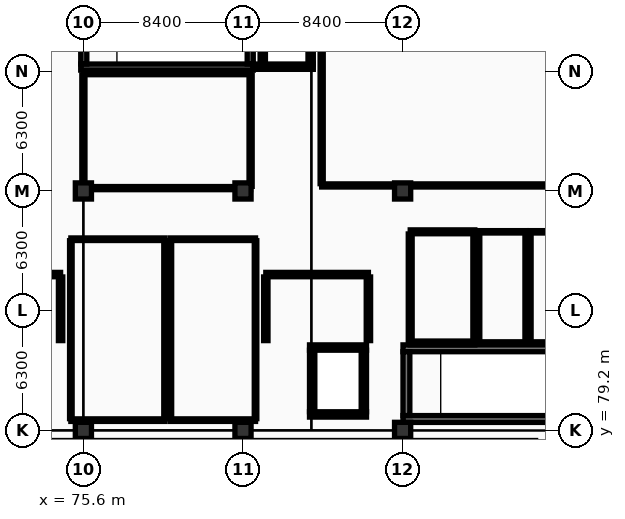
"""IFC4 building model, lengths in metres.
Left out: names, types, materials, properties, quantities, classifications, styles, units other than length and angle.
Written with IfcOpenShell. Run it as: python <this file> out.ifc"""

import sys

from ifc_helpers import new_model, si_unit, direction, frame, frame_2d, origin, origin_2d, place, context, subcontext, project, spatial, rectangle, extrude, element, fill, save


model = new_model("IFC4")
c1 = context("Model", 3, precision=1e-05, world=origin(), true_north=direction((0.0, 1.0)))
c2 = subcontext(c1, "Body", "Model", "MODEL_VIEW")
j1 = project(units=[si_unit("LENGTHUNIT", "METRE"), si_unit("PLANEANGLEUNIT", "RADIAN")], contexts=[c1])
p1 = place(None, origin())
s1 = spatial("IfcSite", under=j1, at=p1, CompositionType="ELEMENT")
p2 = place(p1, origin())
s2 = spatial("IfcBuilding", under=s1, at=p2, CompositionType="ELEMENT")
p3 = place(p2, frame((0.0, 0.0, 5.4)))
s3 = spatial("IfcBuildingStorey", under=s2, at=p3, CompositionType="ELEMENT", Elevation=5.4)
for number, where, z_axis, x_axis in (
    (1, (75.6, 79.2, 0.0), (0.0, 0.0, 1.0), (1.0, 0.0, 0.0)),
    (2, (75.6, 91.8, 0.0), (0.0, 0.0, 1.0), (1.0, 0.0, 0.0)),
    (3, (84.0, 79.2, 0.0), (0.0, 0.0, 1.0), (1.0, 0.0, 0.0)),
    (4, (84.0, 91.8, 0.0), (0.0, 0.0, 1.0), (1.0, 0.0, 0.0)),
    (5, (92.4, 79.2, 0.0), (0.0, 0.0, 1.0), (1.0, 0.0, 0.0)),
    (6, (92.4, 91.8, 0.0), (0.0, 0.0, 1.0), (1.0, 0.0, 0.0)),
):
    element("IfcColumn", number, at=place(p3, frame(where, z_axis=z_axis, x_axis=x_axis)), inside=s3, PredefinedType="COLUMN", context=c2, shape_type="SweptSolid", body=[
        extrude(rectangle(XDim=0.85, YDim=0.85, at=origin_2d()), origin(), (0.0, 0.0, 1.0), 4.5),
    ])
for number, where, z_axis, x_axis in (
    (7, (92.42, 83.52, 0.0), (0.0, 0.0, 1.0), (1.0, 0.0, 0.0)),
    (8, (101.78, 79.8, 0.0), (0.0, 0.0, 1.0), (-1.0, 0.0, 0.0)),
):
    element("IfcWall", number, at=place(p3, frame(where, z_axis=z_axis, x_axis=x_axis)), inside=s3, PredefinedType="SHEAR", context=c2, shape_type="SweptSolid", body=[
        extrude(rectangle(XDim=9.36, YDim=0.36, at=frame_2d((4.68, 0.0))), origin(), (0.0, 0.0, 1.0), 4.24),
    ])
p4 = place(p3, frame((92.6, 79.98, 0.0), z_axis=(0.0, 0.0, 1.0), x_axis=(0.0, 1.0, 0.0)))
e9 = element("IfcWall", 9, at=p4, inside=s3, PredefinedType="SHEAR", context=c2, shape_type="SweptSolid", body=[
    extrude(rectangle(XDim=3.36, YDim=0.36, at=frame_2d((1.68, 0.0))), origin(), (0.0, 0.0, 1.0), 4.24),
])
p5 = place(p4, frame((1.08, 0.0, 0.0)))
e10 = element("IfcOpeningElement", 10, at=p5, cuts=e9, PredefinedType="OPENING", context=c2, shape_type="SweptSolid", body=[
    extrude(rectangle(XDim=1.2, YDim=2.2, at=frame_2d((0.6, 1.1))), frame((0.0, 0.19, 0.0), z_axis=(0.0, -1.0, 0.0), x_axis=(1.0, 0.0, 0.0)), (0.0, 0.0, 1.0), 0.38),
])
p6 = place(p3, frame((84.54, 98.32, 0.0), z_axis=(0.0, 0.0, 1.0), x_axis=(-1.0, 0.0, 0.0)))
e11 = element("IfcWall", 11, at=p6, inside=s3, PredefinedType="SHEAR", context=c2, shape_type="SweptSolid", body=[
    extrude(rectangle(XDim=9.08, YDim=0.32, at=frame_2d((4.54, 0.0))), origin(), (0.0, 0.0, 1.0), 4.24),
])
p7 = place(p3, frame((75.62, 98.48, 0.0), z_axis=(0.0, 0.0, 1.0), x_axis=(0.0, 1.0, 0.0)))
e12 = element("IfcWall", 12, at=p7, inside=s3, PredefinedType="SHEAR", context=c2, shape_type="SweptSolid", body=[
    extrude(rectangle(XDim=3.28, YDim=0.32, at=frame_2d((1.64, 0.0))), origin(), (0.0, 0.0, 1.0), 4.24),
])
p8 = place(p7, frame((1.065, 0.0, 0.0)))
e13 = element("IfcOpeningElement", 13, at=p8, cuts=e12, PredefinedType="OPENING", context=c2, shape_type="SweptSolid", body=[
    extrude(rectangle(XDim=1.15, YDim=2.2, at=frame_2d((0.575, 1.1))), frame((0.0, 0.17, 0.0), z_axis=(0.0, -1.0, 0.0), x_axis=(1.0, 0.0, 0.0)), (0.0, 0.0, 1.0), 0.34),
])
p9 = place(p3, frame((84.38, 101.76, 0.0), z_axis=(0.0, 0.0, 1.0), x_axis=(0.0, -1.0, 0.0)))
e14 = element("IfcWall", 14, at=p9, inside=s3, PredefinedType="SHEAR", context=c2, shape_type="SweptSolid", body=[
    extrude(rectangle(XDim=3.28, YDim=0.32, at=frame_2d((1.64, 0.0))), origin(), (0.0, 0.0, 1.0), 4.24),
])
p10 = place(p3, frame((87.5, 83.56, 0.0), z_axis=(0.0, 0.0, 1.0), x_axis=(1.0, 0.0, 0.0)))
e15 = element("IfcWall", 15, at=p10, inside=s3, PredefinedType="SHEAR", context=c2, shape_type="SweptSolid", body=[
    extrude(rectangle(XDim=3.0, YDim=0.28, at=frame_2d((1.5, 0.0))), origin(), (0.0, 0.0, 1.0), 4.24),
])
p11 = place(p10, frame((0.95, 0.0, 0.0)))
e16 = element("IfcOpeningElement", 16, at=p11, cuts=e15, PredefinedType="OPENING", context=c2, shape_type="SweptSolid", body=[
    extrude(rectangle(XDim=1.1, YDim=2.2, at=frame_2d((0.55, 1.1))), frame((0.0, 0.15, 0.0), z_axis=(0.0, -1.0, 0.0), x_axis=(1.0, 0.0, 0.0)), (0.0, 0.0, 1.0), 0.3),
])
p12 = place(p3, frame((90.5, 80.04, 0.0), z_axis=(0.0, 0.0, 1.0), x_axis=(-1.0, 0.0, 0.0)))
e17 = element("IfcWall", 17, at=p12, inside=s3, PredefinedType="SHEAR", context=c2, shape_type="SweptSolid", body=[
    extrude(rectangle(XDim=3.0, YDim=0.28, at=frame_2d((1.5, 0.0))), origin(), (0.0, 0.0, 1.0), 4.24),
])
for number, where, z_axis, x_axis in (
    (18, (87.64, 80.18, 0.0), (0.0, 0.0, 1.0), (0.0, 1.0, 0.0)),
    (19, (90.36, 83.42, 0.0), (0.0, 0.0, 1.0), (0.0, -1.0, 0.0)),
):
    element("IfcWall", number, at=place(p3, frame(where, z_axis=z_axis, x_axis=x_axis)), inside=s3, PredefinedType="SHEAR", context=c2, shape_type="SweptSolid", body=[
        extrude(rectangle(XDim=3.24, YDim=0.28, at=frame_2d((1.62, 0.0))), origin(), (0.0, 0.0, 1.0), 4.24),
    ])
p13 = place(p3, frame((87.7, 98.34, 0.0), z_axis=(0.0, 0.0, 1.0), x_axis=(-1.0, 0.0, 0.0)))
e20 = element("IfcWall", 20, at=p13, inside=s3, PredefinedType="SHEAR", context=c2, shape_type="SweptSolid", body=[
    extrude(rectangle(XDim=3.16, YDim=0.28, at=frame_2d((1.58, 0.0))), origin(), (0.0, 0.0, 1.0), 4.24),
])
p14 = place(p13, frame((0.925, 0.0, 0.0)))
e21 = element("IfcOpeningElement", 21, at=p14, cuts=e20, PredefinedType="OPENING", context=c2, shape_type="SweptSolid", body=[
    extrude(rectangle(XDim=0.95, YDim=2.15, at=frame_2d((0.475, 1.075))), frame((0.0, 0.15, 0.0), z_axis=(0.0, -1.0, 0.0), x_axis=(1.0, 0.0, 0.0)), (0.0, 0.0, 1.0), 0.3),
])
for number, where, z_axis, x_axis in (
    (22, (85.04, 98.48, 0.0), (0.0, 0.0, 1.0), (0.0, 1.0, 0.0)),
    (23, (87.56, 100.92, 0.0), (0.0, 0.0, 1.0), (0.0, -1.0, 0.0)),
):
    element("IfcWall", number, at=place(p3, frame(where, z_axis=z_axis, x_axis=x_axis)), inside=s3, PredefinedType="SHEAR", context=c2, shape_type="SweptSolid", body=[
        extrude(rectangle(XDim=2.44, YDim=0.28, at=frame_2d((1.22, 0.0))), origin(), (0.0, 0.0, 1.0), 4.24),
    ])
p15 = place(p3, frame((69.0, 87.4, 0.0), z_axis=(0.0, 0.0, 1.0), x_axis=(1.0, 0.0, 0.0)))
e24 = element("IfcWall", 24, at=p15, inside=s3, PredefinedType="STANDARD", context=c2, shape_type="SweptSolid", body=[
    extrude(rectangle(XDim=5.4, YDim=0.23, at=frame_2d((2.7, 0.0))), origin(), (0.0, 0.0, 1.0), 4.225),
])
p16 = place(p15, frame((2.05, 0.0, 0.0)))
e25 = element("IfcOpeningElement", 25, at=p16, cuts=e24, PredefinedType="OPENING", context=c2, shape_type="SweptSolid", body=[
    extrude(rectangle(XDim=1.3, YDim=2.2, at=frame_2d((0.65, 1.1))), frame((0.0, 0.125, 0.0), z_axis=(0.0, -1.0, 0.0), x_axis=(1.0, 0.0, 0.0)), (0.0, 0.0, 1.0), 0.25),
])
p17 = place(p3, frame((74.4, 87.275, 0.0), z_axis=(0.0, 0.0, 1.0), x_axis=(0.0, -1.0, 0.0)))
e26 = element("IfcWall", 26, at=p17, inside=s3, PredefinedType="STANDARD", context=c2, shape_type="SweptSolid", body=[
    extrude(rectangle(XDim=3.35, YDim=0.23, at=frame_2d((1.675, 0.0))), origin(), (0.0, 0.0, 1.0), 4.225),
])
p18 = place(p3, frame((85.2, 87.4, 0.0), z_axis=(0.0, 0.0, 1.0), x_axis=(1.0, 0.0, 0.0)))
e27 = element("IfcWall", 27, at=p18, inside=s3, PredefinedType="STANDARD", context=c2, shape_type="SweptSolid", body=[
    extrude(rectangle(XDim=5.4, YDim=0.23, at=frame_2d((2.7, 0.0))), origin(), (0.0, 0.0, 1.0), 3.62),
])
p19 = place(p18, frame((2.05, 0.0, 0.0)))
e28 = element("IfcOpeningElement", 28, at=p19, cuts=e27, PredefinedType="OPENING", context=c2, shape_type="SweptSolid", body=[
    extrude(rectangle(XDim=1.3, YDim=2.2, at=frame_2d((0.65, 1.1))), frame((0.0, 0.125, 0.0), z_axis=(0.0, -1.0, 0.0), x_axis=(1.0, 0.0, 0.0)), (0.0, 0.0, 1.0), 0.25),
])
for number, where, z_axis, x_axis in (
    (29, (85.2, 83.925, 0.0), (0.0, 0.0, 1.0), (0.0, 1.0, 0.0)),
    (30, (90.6, 87.275, 0.0), (0.0, 0.0, 1.0), (0.0, -1.0, 0.0)),
):
    element("IfcWall", number, at=place(p3, frame(where, z_axis=z_axis, x_axis=x_axis)), inside=s3, PredefinedType="STANDARD", context=c2, shape_type="SweptSolid", body=[
        extrude(rectangle(XDim=3.35, YDim=0.23, at=frame_2d((1.675, 0.0))), origin(), (0.0, 0.0, 1.0), 3.62),
    ])
p20 = place(p3, frame((96.4, 89.65, 0.0), z_axis=(0.0, 0.0, 1.0), x_axis=(1.0, 0.0, 0.0)))
e31 = element("IfcWall", 31, at=p20, inside=s3, PredefinedType="PARTITIONING", context=c2, shape_type="SweptSolid", body=[
    extrude(rectangle(XDim=2.5, YDim=0.125, at=frame_2d((1.25, 0.0))), origin(), (0.0, 0.0, 1.0), 4.225),
])
p21 = place(p20, frame((0.8, 0.0, 0.0)))
e32 = element("IfcOpeningElement", 32, at=p21, cuts=e31, PredefinedType="OPENING", context=c2, shape_type="SweptSolid", body=[
    extrude(rectangle(XDim=0.9, YDim=2.1, at=frame_2d((0.45, 1.05))), frame((0.0, 0.073, 0.0), z_axis=(0.0, -1.0, 0.0), x_axis=(1.0, 0.0, 0.0)), (0.0, 0.0, 1.0), 0.145),
])
p22 = place(p3, frame((98.9, 83.8, 0.0), z_axis=(0.0, 0.0, 1.0), x_axis=(-1.0, 0.0, 0.0)))
e33 = element("IfcWall", 33, at=p22, inside=s3, PredefinedType="PARTITIONING", context=c2, shape_type="SweptSolid", body=[
    extrude(rectangle(XDim=2.5, YDim=0.125, at=frame_2d((1.25, 0.0))), origin(), (0.0, 0.0, 1.0), 4.225),
])
for number, where, z_axis, x_axis in (
    (34, (96.4, 83.873, 0.0), (0.0, 0.0, 1.0), (0.0, 1.0, 0.0)),
    (35, (98.9, 89.577, 0.0), (0.0, 0.0, 1.0), (0.0, -1.0, 0.0)),
):
    element("IfcWall", number, at=place(p3, frame(where, z_axis=z_axis, x_axis=x_axis)), inside=s3, PredefinedType="PARTITIONING", context=c2, shape_type="SweptSolid", body=[
        extrude(rectangle(XDim=5.705, YDim=0.125, at=frame_2d((2.853, 0.0))), origin(), (0.0, 0.0, 1.0), 3.62),
    ])
p23 = place(p3, frame((99.1, 89.65, 0.0), z_axis=(0.0, 0.0, 1.0), x_axis=(1.0, 0.0, 0.0)))
e36 = element("IfcWall", 36, at=p23, inside=s3, PredefinedType="PARTITIONING", context=c2, shape_type="SweptSolid", body=[
    extrude(rectangle(XDim=2.5, YDim=0.125, at=frame_2d((1.25, 0.0))), origin(), (0.0, 0.0, 1.0), 3.37),
])
p24 = place(p23, frame((0.75, 0.0, 0.0)))
e37 = element("IfcOpeningElement", 37, at=p24, cuts=e36, PredefinedType="OPENING", context=c2, shape_type="SweptSolid", body=[
    extrude(rectangle(XDim=1.0, YDim=2.1, at=frame_2d((0.5, 1.05))), frame((0.0, 0.073, 0.0), z_axis=(0.0, -1.0, 0.0), x_axis=(1.0, 0.0, 0.0)), (0.0, 0.0, 1.0), 0.145),
])
p25 = place(p3, frame((101.6, 83.8, 0.0), z_axis=(0.0, 0.0, 1.0), x_axis=(-1.0, 0.0, 0.0)))
e38 = element("IfcWall", 38, at=p25, inside=s3, PredefinedType="PARTITIONING", context=c2, shape_type="SweptSolid", body=[
    extrude(rectangle(XDim=2.5, YDim=0.125, at=frame_2d((1.25, 0.0))), origin(), (0.0, 0.0, 1.0), 3.37),
])
p26 = place(p3, frame((99.1, 83.873, 0.0), z_axis=(0.0, 0.0, 1.0), x_axis=(0.0, 1.0, 0.0)))
e39 = element("IfcWall", 39, at=p26, inside=s3, PredefinedType="PARTITIONING", context=c2, shape_type="SweptSolid", body=[
    extrude(rectangle(XDim=5.705, YDim=0.125, at=frame_2d((2.853, 0.0))), origin(), (0.0, 0.0, 1.0), 3.62),
])
p27 = place(p3, frame((92.8, 89.65, 0.0), z_axis=(0.0, 0.0, 1.0), x_axis=(1.0, 0.0, 0.0)))
e40 = element("IfcWall", 40, at=p27, inside=s3, PredefinedType="STANDARD", context=c2, shape_type="SweptSolid", body=[
    extrude(rectangle(XDim=3.4, YDim=0.205, at=frame_2d((1.7, 0.0))), origin(), (0.0, 0.0, 1.0), 3.37),
])
p28 = place(p27, frame((1.0, 0.0, 0.0)))
e41 = element("IfcOpeningElement", 41, at=p28, cuts=e40, PredefinedType="OPENING", context=c2, shape_type="SweptSolid", body=[
    extrude(rectangle(XDim=1.4, YDim=2.25, at=frame_2d((0.7, 1.125))), frame((0.0, 0.113, 0.0), z_axis=(0.0, -1.0, 0.0), x_axis=(1.0, 0.0, 0.0)), (0.0, 0.0, 1.0), 0.225),
])
p29 = place(p3, frame((96.2, 83.8, 0.0), z_axis=(0.0, 0.0, 1.0), x_axis=(-1.0, 0.0, 0.0)))
e42 = element("IfcWall", 42, at=p29, inside=s3, PredefinedType="STANDARD", context=c2, shape_type="SweptSolid", body=[
    extrude(rectangle(XDim=3.4, YDim=0.205, at=frame_2d((1.7, 0.0))), origin(), (0.0, 0.0, 1.0), 3.37),
])
p30 = place(p3, frame((92.8, 83.913, 0.0), z_axis=(0.0, 0.0, 1.0), x_axis=(0.0, 1.0, 0.0)))
e43 = element("IfcWall", 43, at=p30, inside=s3, PredefinedType="STANDARD", context=c2, shape_type="SweptSolid", body=[
    extrude(rectangle(XDim=5.625, YDim=0.205, at=frame_2d((2.812, 0.0))), origin(), (0.0, 0.0, 1.0), 3.37),
])
p31 = place(p3, frame((96.2, 89.538, 0.0), z_axis=(0.0, 0.0, 1.0), x_axis=(0.0, -1.0, 0.0)))
e44 = element("IfcWall", 44, at=p31, inside=s3, PredefinedType="STANDARD", context=c2, shape_type="SweptSolid", body=[
    extrude(rectangle(XDim=5.625, YDim=0.205, at=frame_2d((2.812, 0.0))), origin(), (0.0, 0.0, 1.0), 3.62),
])
p32 = place(p3, frame((75.6, 98.0, 0.0), z_axis=(0.0, 0.0, 1.0), x_axis=(1.0, 0.0, 0.0)))
e45 = element("IfcWall", 45, at=p32, inside=s3, PredefinedType="PARTITIONING", context=c2, shape_type="SweptSolid", body=[
    extrude(rectangle(XDim=8.8, YDim=0.165, at=frame_2d((4.4, 0.0))), origin(), (0.0, 0.0, 1.0), 3.37),
])
p33 = place(p3, frame((84.4, 91.95, 0.0), z_axis=(0.0, 0.0, 1.0), x_axis=(-1.0, 0.0, 0.0)))
e46 = element("IfcWall", 46, at=p33, inside=s3, PredefinedType="PARTITIONING", context=c2, shape_type="SweptSolid", body=[
    extrude(rectangle(XDim=8.8, YDim=0.165, at=frame_2d((4.4, 0.0))), origin(), (0.0, 0.0, 1.0), 3.37),
])
p34 = place(p33, frame((3.545, 0.0, 0.0)))
e47 = element("IfcOpeningElement", 47, at=p34, cuts=e46, PredefinedType="OPENING", context=c2, shape_type="SweptSolid", body=[
    extrude(rectangle(XDim=1.0, YDim=2.15, at=frame_2d((0.5, 1.075))), frame((0.0, 0.093, 0.0), z_axis=(0.0, -1.0, 0.0), x_axis=(1.0, 0.0, 0.0)), (0.0, 0.0, 1.0), 0.185),
])
for number, where, z_axis, x_axis in (
    (48, (75.6, 92.042, 0.0), (0.0, 0.0, 1.0), (0.0, 1.0, 0.0)),
    (49, (84.4, 97.907, 0.0), (0.0, 0.0, 1.0), (0.0, -1.0, 0.0)),
):
    element("IfcWall", number, at=place(p3, frame(where, z_axis=z_axis, x_axis=x_axis)), inside=s3, PredefinedType="PARTITIONING", context=c2, shape_type="SweptSolid", body=[
        extrude(rectangle(XDim=5.865, YDim=0.165, at=frame_2d((2.933, 0.0))), origin(), (0.0, 0.0, 1.0), 3.37),
    ])
p35 = place(p3, frame((101.66, 92.09, 0.0), z_axis=(0.0, 0.0, 1.0), x_axis=(-1.0, 0.0, 0.0)))
e50 = element("IfcWall", 50, at=p35, inside=s3, PredefinedType="PARTITIONING", context=c2, shape_type="SweptSolid", body=[
    extrude(rectangle(XDim=13.52, YDim=0.165, at=frame_2d((6.76, 0.0))), origin(), (0.0, 0.0, 1.0), 3.37),
])
p36 = place(p35, frame((2.714, 0.0, 0.0)))
e51 = element("IfcOpeningElement", 51, at=p36, cuts=e50, PredefinedType="OPENING", context=c2, shape_type="SweptSolid", body=[
    extrude(rectangle(XDim=1.0, YDim=2.15, at=frame_2d((0.5, 1.075))), frame((0.0, 0.093, 0.0), z_axis=(0.0, -1.0, 0.0), x_axis=(1.0, 0.0, 0.0)), (0.0, 0.0, 1.0), 0.185),
])
p37 = place(p3, frame((88.14, 92.183, 0.0), z_axis=(0.0, 0.0, 1.0), x_axis=(0.0, 1.0, 0.0)))
e52 = element("IfcWall", 52, at=p37, inside=s3, PredefinedType="PARTITIONING", context=c2, shape_type="SweptSolid", body=[
    extrude(rectangle(XDim=11.085, YDim=0.165, at=frame_2d((5.542, 0.0))), origin(), (0.0, 0.0, 1.0), 3.57),
])
p38 = place(p3, frame((74.94, 89.26, 0.0), z_axis=(0.0, 0.0, 1.0), x_axis=(1.0, 0.0, 0.0)))
e53 = element("IfcWall", 53, at=p38, inside=s3, PredefinedType="PARTITIONING", context=c2, shape_type="SweptSolid", body=[
    extrude(rectangle(XDim=4.958, YDim=0.135, at=frame_2d((2.479, 0.0))), origin(), (0.0, 0.0, 1.0), 3.37),
])
p39 = place(p38, frame((2.131, 0.0, 0.0)))
e54 = element("IfcOpeningElement", 54, at=p39, cuts=e53, PredefinedType="OPENING", context=c2, shape_type="SweptSolid", body=[
    extrude(rectangle(XDim=1.02, YDim=2.15, at=frame_2d((0.51, 1.075))), frame((0.0, 0.077, 0.0), z_axis=(0.0, -1.0, 0.0), x_axis=(1.0, 0.0, 0.0)), (0.0, 0.0, 1.0), 0.155),
])
p40 = place(p3, frame((79.898, 79.74, 0.0), z_axis=(0.0, 0.0, 1.0), x_axis=(-1.0, 0.0, 0.0)))
e55 = element("IfcWall", 55, at=p40, inside=s3, PredefinedType="PARTITIONING", context=c2, shape_type="SweptSolid", body=[
    extrude(rectangle(XDim=4.958, YDim=0.135, at=frame_2d((2.479, 0.0))), origin(), (0.0, 0.0, 1.0), 3.37),
])
p41 = place(p3, frame((74.94, 79.817, 0.0), z_axis=(0.0, 0.0, 1.0), x_axis=(0.0, 1.0, 0.0)))
e56 = element("IfcWall", 56, at=p41, inside=s3, PredefinedType="PARTITIONING", context=c2, shape_type="SweptSolid", body=[
    extrude(rectangle(XDim=9.365, YDim=0.135, at=frame_2d((4.683, 0.0))), origin(), (0.0, 0.0, 1.0), 4.225),
])
p42 = place(p3, frame((79.898, 89.183, 0.0), z_axis=(0.0, 0.0, 1.0), x_axis=(0.0, -1.0, 0.0)))
e57 = element("IfcWall", 57, at=p42, inside=s3, PredefinedType="PARTITIONING", context=c2, shape_type="SweptSolid", body=[
    extrude(rectangle(XDim=9.365, YDim=0.135, at=frame_2d((4.683, 0.0))), origin(), (0.0, 0.0, 1.0), 3.62),
])
p43 = place(p3, frame((80.178, 89.26, 0.0), z_axis=(0.0, 0.0, 1.0), x_axis=(1.0, 0.0, 0.0)))
e58 = element("IfcWall", 58, at=p43, inside=s3, PredefinedType="PARTITIONING", context=c2, shape_type="SweptSolid", body=[
    extrude(rectangle(XDim=4.482, YDim=0.135, at=frame_2d((2.241, 0.0))), origin(), (0.0, 0.0, 1.0), 3.37),
])
p44 = place(p43, frame((1.483, 0.0, 0.0)))
e59 = element("IfcOpeningElement", 59, at=p44, cuts=e58, PredefinedType="OPENING", context=c2, shape_type="SweptSolid", body=[
    extrude(rectangle(XDim=0.95, YDim=2.15, at=frame_2d((0.475, 1.075))), frame((0.0, 0.077, 0.0), z_axis=(0.0, -1.0, 0.0), x_axis=(1.0, 0.0, 0.0)), (0.0, 0.0, 1.0), 0.155),
])
p45 = place(p3, frame((84.66, 79.74, 0.0), z_axis=(0.0, 0.0, 1.0), x_axis=(-1.0, 0.0, 0.0)))
e60 = element("IfcWall", 60, at=p45, inside=s3, PredefinedType="PARTITIONING", context=c2, shape_type="SweptSolid", body=[
    extrude(rectangle(XDim=4.482, YDim=0.135, at=frame_2d((2.241, 0.0))), origin(), (0.0, 0.0, 1.0), 3.37),
])
for number, where, z_axis, x_axis in (
    (61, (80.178, 79.817, 0.0), (0.0, 0.0, 1.0), (0.0, 1.0, 0.0)),
    (62, (84.66, 89.183, 0.0), (0.0, 0.0, 1.0), (0.0, -1.0, 0.0)),
):
    element("IfcWall", number, at=place(p3, frame(where, z_axis=z_axis, x_axis=x_axis)), inside=s3, PredefinedType="PARTITIONING", context=c2, shape_type="SweptSolid", body=[
        extrude(rectangle(XDim=9.365, YDim=0.135, at=frame_2d((4.683, 0.0))), origin(), (0.0, 0.0, 1.0), 3.62),
    ])
p46 = place(p5, origin())
e63 = element("IfcDoor", 63, at=p46, inside=s3, OperationType="SINGLE_SWING_RIGHT", PredefinedType="DOOR", context=c2, shape_type="SweptSolid", body=[
    extrude(rectangle(XDim=1.2, YDim=2.2, at=frame_2d((0.6, 1.1))), frame((0.0, 0.025, 0.0), z_axis=(0.0, -1.0, 0.0), x_axis=(1.0, 0.0, 0.0)), (0.0, 0.0, 1.0), 0.05),
])
fill(e10, e63)
p47 = place(p11, origin())
e64 = element("IfcDoor", 64, at=p47, inside=s3, OperationType="DOUBLE_DOOR_SLIDING", PredefinedType="DOOR", context=c2, shape_type="SweptSolid", body=[
    extrude(rectangle(XDim=1.1, YDim=2.2, at=frame_2d((0.55, 1.1))), frame((0.0, 0.025, 0.0), z_axis=(0.0, -1.0, 0.0), x_axis=(1.0, 0.0, 0.0)), (0.0, 0.0, 1.0), 0.05),
])
fill(e16, e64)
p48 = place(p14, origin())
e65 = element("IfcDoor", 65, at=p48, inside=s3, OperationType="DOUBLE_DOOR_SLIDING", PredefinedType="DOOR", context=c2, shape_type="SweptSolid", body=[
    extrude(rectangle(XDim=0.95, YDim=2.15, at=frame_2d((0.475, 1.075))), frame((0.0, 0.025, 0.0), z_axis=(0.0, -1.0, 0.0), x_axis=(1.0, 0.0, 0.0)), (0.0, 0.0, 1.0), 0.05),
])
fill(e21, e65)
p49 = place(p19, origin())
e66 = element("IfcDoor", 66, at=p49, inside=s3, OperationType="SINGLE_SWING_RIGHT", PredefinedType="DOOR", context=c2, shape_type="SweptSolid", body=[
    extrude(rectangle(XDim=1.3, YDim=2.2, at=frame_2d((0.65, 1.1))), frame((0.0, 0.025, 0.0), z_axis=(0.0, -1.0, 0.0), x_axis=(1.0, 0.0, 0.0)), (0.0, 0.0, 1.0), 0.05),
])
fill(e28, e66)
p50 = place(p21, origin())
e67 = element("IfcDoor", 67, at=p50, inside=s3, OperationType="SINGLE_SWING_LEFT", PredefinedType="DOOR", context=c2, shape_type="SweptSolid", body=[
    extrude(rectangle(XDim=0.9, YDim=2.1, at=frame_2d((0.45, 1.05))), frame((0.0, 0.025, 0.0), z_axis=(0.0, -1.0, 0.0), x_axis=(1.0, 0.0, 0.0)), (0.0, 0.0, 1.0), 0.05),
])
fill(e32, e67)
p51 = place(p24, origin())
e68 = element("IfcDoor", 68, at=p51, inside=s3, OperationType="SINGLE_SWING_RIGHT", PredefinedType="DOOR", context=c2, shape_type="SweptSolid", body=[
    extrude(rectangle(XDim=1.0, YDim=2.1, at=frame_2d((0.5, 1.05))), frame((0.0, 0.025, 0.0), z_axis=(0.0, -1.0, 0.0), x_axis=(1.0, 0.0, 0.0)), (0.0, 0.0, 1.0), 0.05),
])
fill(e37, e68)
p52 = place(p28, origin())
e69 = element("IfcDoor", 69, at=p52, inside=s3, OperationType="SINGLE_SWING_RIGHT", PredefinedType="DOOR", context=c2, shape_type="SweptSolid", body=[
    extrude(rectangle(XDim=1.4, YDim=2.25, at=frame_2d((0.7, 1.125))), frame((0.0, 0.025, 0.0), z_axis=(0.0, -1.0, 0.0), x_axis=(1.0, 0.0, 0.0)), (0.0, 0.0, 1.0), 0.05),
])
fill(e41, e69)
p53 = place(p34, origin())
e70 = element("IfcDoor", 70, at=p53, inside=s3, OperationType="SINGLE_SWING_LEFT", PredefinedType="DOOR", context=c2, shape_type="SweptSolid", body=[
    extrude(rectangle(XDim=1.0, YDim=2.15, at=frame_2d((0.5, 1.075))), frame((0.0, 0.025, 0.0), z_axis=(0.0, -1.0, 0.0), x_axis=(1.0, 0.0, 0.0)), (0.0, 0.0, 1.0), 0.05),
])
fill(e47, e70)
p54 = place(p36, origin())
e71 = element("IfcDoor", 71, at=p54, inside=s3, OperationType="SINGLE_SWING_RIGHT", PredefinedType="DOOR", context=c2, shape_type="SweptSolid", body=[
    extrude(rectangle(XDim=1.0, YDim=2.15, at=frame_2d((0.5, 1.075))), frame((0.0, 0.025, 0.0), z_axis=(0.0, -1.0, 0.0), x_axis=(1.0, 0.0, 0.0)), (0.0, 0.0, 1.0), 0.05),
])
fill(e51, e71)
p55 = place(p39, origin())
e72 = element("IfcDoor", 72, at=p55, inside=s3, OperationType="SINGLE_SWING_LEFT", PredefinedType="DOOR", context=c2, shape_type="SweptSolid", body=[
    extrude(rectangle(XDim=1.02, YDim=2.15, at=frame_2d((0.51, 1.075))), frame((0.0, 0.025, 0.0), z_axis=(0.0, -1.0, 0.0), x_axis=(1.0, 0.0, 0.0)), (0.0, 0.0, 1.0), 0.05),
])
fill(e54, e72)
p56 = place(p44, origin())
e73 = element("IfcDoor", 73, at=p56, inside=s3, OperationType="SINGLE_SWING_RIGHT", PredefinedType="DOOR", context=c2, shape_type="SweptSolid", body=[
    extrude(rectangle(XDim=0.95, YDim=2.15, at=frame_2d((0.475, 1.075))), frame((0.0, 0.025, 0.0), z_axis=(0.0, -1.0, 0.0), x_axis=(1.0, 0.0, 0.0)), (0.0, 0.0, 1.0), 0.05),
])
fill(e59, e73)
save(model, sys.argv[1])
